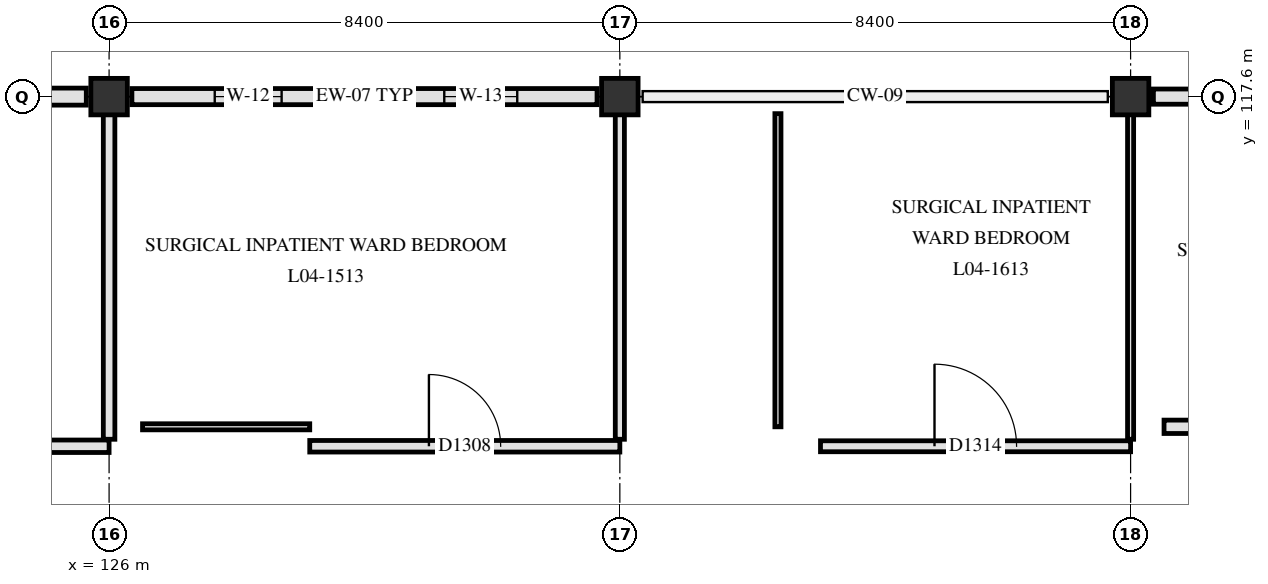
"""IFC4 building model, lengths in metres.
Left out: names, types, materials, properties, quantities, classifications, styles, units other than length and angle.
Written with IfcOpenShell. Run it as: python <this file> out.ifc"""

import sys

from ifc_helpers import new_model, si_unit, direction, frame, frame_2d, origin, origin_2d, place, context, subcontext, project, spatial, rectangle, extrude, element, fill, save


model = new_model("IFC4")
c1 = context("Model", 3, precision=1e-05, world=origin(), true_north=direction((0.0, 1.0)))
c2 = subcontext(c1, "Body", "Model", "MODEL_VIEW")
j1 = project(units=[si_unit("LENGTHUNIT", "METRE"), si_unit("PLANEANGLEUNIT", "RADIAN")], contexts=[c1])
p1 = place(None, origin())
s1 = spatial("IfcSite", under=j1, at=p1, CompositionType="ELEMENT")
p2 = place(p1, origin())
s2 = spatial("IfcBuilding", under=s1, at=p2, CompositionType="ELEMENT")
p3 = place(p2, frame((0.0, 0.0, 18.6)))
s3 = spatial("IfcBuildingStorey", under=s2, at=p3, CompositionType="ELEMENT", Elevation=18.6)
for number, where, z_axis, x_axis in (
    (1, (126.0, 117.6, 0.0), (0.0, 0.0, 1.0), (1.0, 0.0, 0.0)),
    (2, (134.4, 117.6, 0.0), (0.0, 0.0, 1.0), (1.0, 0.0, 0.0)),
    (3, (142.8, 117.6, 0.0), (0.0, 0.0, 1.0), (1.0, 0.0, 0.0)),
):
    element("IfcColumn", number, at=place(p3, frame(where, z_axis=z_axis, x_axis=x_axis)), inside=s3, PredefinedType="COLUMN", context=c2, shape_type="SweptSolid", body=[
        extrude(rectangle(XDim=0.6, YDim=0.6, at=origin_2d()), origin(), (0.0, 0.0, 1.0), 3.9),
    ])
p4 = place(p3, frame((117.975, 117.6, 0.0), z_axis=(0.0, 0.0, 1.0), x_axis=(1.0, 0.0, 0.0)))
e4 = element("IfcWall", 4, at=p4, inside=s3, PredefinedType="SOLIDWALL", context=c2, shape_type="SweptSolid", body=[
    extrude(rectangle(XDim=7.65, YDim=0.28, at=frame_2d((3.825, 0.0))), origin(), (0.0, 0.0, 1.0), 3.31),
])
p5 = place(p4, frame((0.988, 0.0, 0.85)))
e5 = element("IfcOpeningElement", 5, at=p5, cuts=e4, PredefinedType="OPENING", context=c2, shape_type="SweptSolid", body=[
    extrude(rectangle(XDim=1.85, YDim=1.3, at=frame_2d((0.925, 0.65))), frame((0.0, 0.15, 0.0), z_axis=(0.0, -1.0, 0.0), x_axis=(1.0, 0.0, 0.0)), (0.0, 0.0, 1.0), 0.3),
])
p6 = place(p4, frame((5.238, 0.0, 0.85)))
e6 = element("IfcOpeningElement", 6, at=p6, cuts=e4, PredefinedType="OPENING", context=c2, shape_type="SweptSolid", body=[
    extrude(rectangle(XDim=1.0, YDim=1.42, at=frame_2d((0.5, 0.71))), frame((0.0, 0.15, 0.0), z_axis=(0.0, -1.0, 0.0), x_axis=(1.0, 0.0, 0.0)), (0.0, 0.0, 1.0), 0.3),
])
p7 = place(p3, frame((126.375, 117.6, 0.0), z_axis=(0.0, 0.0, 1.0), x_axis=(1.0, 0.0, 0.0)))
e7 = element("IfcWall", 7, at=p7, inside=s3, PredefinedType="SOLIDWALL", context=c2, shape_type="SweptSolid", body=[
    extrude(rectangle(XDim=7.65, YDim=0.265, at=frame_2d((3.825, 0.0))), origin(), (0.0, 0.0, 1.0), 3.31),
])
p8 = place(p7, frame((1.363, 0.0, 0.85)))
e8 = element("IfcOpeningElement", 8, at=p8, cuts=e7, PredefinedType="OPENING", context=c2, shape_type="SweptSolid", body=[
    extrude(rectangle(XDim=1.1, YDim=1.42, at=frame_2d((0.55, 0.71))), frame((0.0, 0.142, 0.0), z_axis=(0.0, -1.0, 0.0), x_axis=(1.0, 0.0, 0.0)), (0.0, 0.0, 1.0), 0.285),
])
p9 = place(p7, frame((5.137, 0.0, 0.85)))
e9 = element("IfcOpeningElement", 9, at=p9, cuts=e7, PredefinedType="OPENING", context=c2, shape_type="SweptSolid", body=[
    extrude(rectangle(XDim=1.2, YDim=1.42, at=frame_2d((0.6, 0.71))), frame((0.0, 0.142, 0.0), z_axis=(0.0, -1.0, 0.0), x_axis=(1.0, 0.0, 0.0)), (0.0, 0.0, 1.0), 0.285),
])
p10 = place(p3, frame((143.175, 117.6, 0.0), z_axis=(0.0, 0.0, 1.0), x_axis=(1.0, 0.0, 0.0)))
e10 = element("IfcWall", 10, at=p10, inside=s3, PredefinedType="SOLIDWALL", context=c2, shape_type="SweptSolid", body=[
    extrude(rectangle(XDim=7.65, YDim=0.25, at=frame_2d((3.825, 0.0))), origin(), (0.0, 0.0, 1.0), 3.31),
])
p11 = place(p10, frame((1.262, 0.0, 0.85)))
e11 = element("IfcOpeningElement", 11, at=p11, cuts=e10, PredefinedType="OPENING", context=c2, shape_type="SweptSolid", body=[
    extrude(rectangle(XDim=1.3, YDim=1.42, at=frame_2d((0.65, 0.71))), frame((0.0, 0.135, 0.0), z_axis=(0.0, -1.0, 0.0), x_axis=(1.0, 0.0, 0.0)), (0.0, 0.0, 1.0), 0.27),
])
p12 = place(p10, frame((5.038, 0.0, 0.85)))
e12 = element("IfcOpeningElement", 12, at=p12, cuts=e10, PredefinedType="OPENING", context=c2, shape_type="SweptSolid", body=[
    extrude(rectangle(XDim=1.4, YDim=1.42, at=frame_2d((0.7, 0.71))), frame((0.0, 0.135, 0.0), z_axis=(0.0, -1.0, 0.0), x_axis=(1.0, 0.0, 0.0)), (0.0, 0.0, 1.0), 0.27),
])
p13 = place(p3, frame((120.9, 111.85, 0.0), z_axis=(0.0, 0.0, 1.0), x_axis=(1.0, 0.0, 0.0)))
e13 = element("IfcWall", 13, at=p13, inside=s3, PredefinedType="PARTITIONING", context=c2, shape_type="SweptSolid", body=[
    extrude(rectangle(XDim=5.1, YDim=0.205, at=frame_2d((2.55, 0.0))), origin(), (0.0, 0.0, 1.0), 3.26),
])
p14 = place(p13, frame((1.63, 0.0, 0.0)))
e14 = element("IfcOpeningElement", 14, at=p14, cuts=e13, PredefinedType="OPENING", context=c2, shape_type="SweptSolid", body=[
    extrude(rectangle(XDim=1.84, YDim=2.28, at=frame_2d((0.92, 1.14))), frame((0.0, 0.113, 0.0), z_axis=(0.0, -1.0, 0.0), x_axis=(1.0, 0.0, 0.0)), (0.0, 0.0, 1.0), 0.225),
])
p15 = place(p3, frame((129.3, 111.85, 0.0), z_axis=(0.0, 0.0, 1.0), x_axis=(1.0, 0.0, 0.0)))
e15 = element("IfcWall", 15, at=p15, inside=s3, PredefinedType="PARTITIONING", context=c2, shape_type="SweptSolid", body=[
    extrude(rectangle(XDim=5.1, YDim=0.19, at=frame_2d((2.55, 0.0))), origin(), (0.0, 0.0, 1.0), 3.26),
])
p16 = place(p15, frame((1.96, 0.0, 0.0)))
e16 = element("IfcOpeningElement", 16, at=p16, cuts=e15, PredefinedType="OPENING", context=c2, shape_type="SweptSolid", body=[
    extrude(rectangle(XDim=1.18, YDim=2.18, at=frame_2d((0.59, 1.09))), frame((0.0, 0.105, 0.0), z_axis=(0.0, -1.0, 0.0), x_axis=(1.0, 0.0, 0.0)), (0.0, 0.0, 1.0), 0.21),
])
p17 = place(p3, frame((137.7, 111.85, 0.0), z_axis=(0.0, 0.0, 1.0), x_axis=(1.0, 0.0, 0.0)))
e17 = element("IfcWall", 17, at=p17, inside=s3, PredefinedType="PARTITIONING", context=c2, shape_type="SweptSolid", body=[
    extrude(rectangle(XDim=5.1, YDim=0.18, at=frame_2d((2.55, 0.0))), origin(), (0.0, 0.0, 1.0), 3.26),
])
p18 = place(p17, frame((1.875, 0.0, 0.0)))
e18 = element("IfcOpeningElement", 18, at=p18, cuts=e17, PredefinedType="OPENING", context=c2, shape_type="SweptSolid", body=[
    extrude(rectangle(XDim=1.35, YDim=2.2, at=frame_2d((0.675, 1.1))), frame((0.0, 0.1, 0.0), z_axis=(0.0, -1.0, 0.0), x_axis=(1.0, 0.0, 0.0)), (0.0, 0.0, 1.0), 0.2),
])
p19 = place(p3, frame((126.55, 112.17, 0.0), z_axis=(0.0, 0.0, 1.0), x_axis=(1.0, 0.0, 0.0)))
e19 = element("IfcWall", 19, at=p19, inside=s3, PredefinedType="PARTITIONING", context=c2, shape_type="SweptSolid", body=[
    extrude(rectangle(XDim=2.75, YDim=0.1, at=frame_2d((1.375, 0.0))), origin(), (0.0, 0.0, 1.0), 3.61),
])
p20 = place(p3, frame((143.35, 112.17, 0.0), z_axis=(0.0, 0.0, 1.0), x_axis=(1.0, 0.0, 0.0)))
e20 = element("IfcWall", 20, at=p20, inside=s3, PredefinedType="PARTITIONING", context=c2, shape_type="SweptSolid", body=[
    extrude(rectangle(XDim=2.75, YDim=0.22, at=frame_2d((1.375, 0.0))), origin(), (0.0, 0.0, 1.0), 3.31),
])
p21 = place(p3, frame((126.0, 111.965, 0.0), z_axis=(0.0, 0.0, 1.0), x_axis=(0.0, 1.0, 0.0)))
e21 = element("IfcWall", 21, at=p21, inside=s3, PredefinedType="PARTITIONING", context=c2, shape_type="SweptSolid", body=[
    extrude(rectangle(XDim=5.34, YDim=0.19, at=frame_2d((2.67, 0.0))), origin(), (0.0, 0.0, 1.0), 3.26),
])
p22 = place(p3, frame((134.4, 111.965, 0.0), z_axis=(0.0, 0.0, 1.0), x_axis=(0.0, 1.0, 0.0)))
e22 = element("IfcWall", 22, at=p22, inside=s3, PredefinedType="PARTITIONING", context=c2, shape_type="SweptSolid", body=[
    extrude(rectangle(XDim=5.34, YDim=0.15, at=frame_2d((2.67, 0.0))), origin(), (0.0, 0.0, 1.0), 3.26),
])
p23 = place(p3, frame((137.0, 112.17, 0.0), z_axis=(0.0, 0.0, 1.0), x_axis=(0.0, 1.0, 0.0)))
e23 = element("IfcWall", 23, at=p23, inside=s3, PredefinedType="PARTITIONING", context=c2, shape_type="SweptSolid", body=[
    extrude(rectangle(XDim=5.15, YDim=0.1, at=frame_2d((2.575, 0.0))), origin(), (0.0, 0.0, 1.0), 3.31),
])
p24 = place(p3, frame((142.8, 111.965, 0.0), z_axis=(0.0, 0.0, 1.0), x_axis=(0.0, 1.0, 0.0)))
e24 = element("IfcWall", 24, at=p24, inside=s3, PredefinedType="PARTITIONING", context=c2, shape_type="SweptSolid", body=[
    extrude(rectangle(XDim=5.34, YDim=0.1, at=frame_2d((2.67, 0.0))), origin(), (0.0, 0.0, 1.0), 3.26),
])
p25 = place(p8, origin())
e25 = element("IfcWindow", 25, at=p25, inside=s3, PartitioningType="SINGLE_PANEL", PredefinedType="WINDOW", context=c2, shape_type="SweptSolid", body=[
    extrude(rectangle(XDim=1.1, YDim=1.42, at=frame_2d((0.55, 0.71))), frame((0.0, 0.03, 0.0), z_axis=(0.0, -1.0, 0.0), x_axis=(1.0, 0.0, 0.0)), (0.0, 0.0, 1.0), 0.06),
])
fill(e8, e25)
p26 = place(p9, origin())
e26 = element("IfcWindow", 26, at=p26, inside=s3, PartitioningType="SINGLE_PANEL", PredefinedType="WINDOW", context=c2, shape_type="SweptSolid", body=[
    extrude(rectangle(XDim=1.2, YDim=1.42, at=frame_2d((0.6, 0.71))), frame((0.0, 0.03, 0.0), z_axis=(0.0, -1.0, 0.0), x_axis=(1.0, 0.0, 0.0)), (0.0, 0.0, 1.0), 0.06),
])
fill(e9, e26)
p27 = place(p16, origin())
e27 = element("IfcDoor", 27, at=p27, inside=s3, OperationType="SINGLE_SWING_LEFT", PredefinedType="DOOR", context=c2, shape_type="SweptSolid", body=[
    extrude(rectangle(XDim=1.18, YDim=2.18, at=frame_2d((0.59, 1.09))), frame((0.0, 0.025, 0.0), z_axis=(0.0, -1.0, 0.0), x_axis=(1.0, 0.0, 0.0)), (0.0, 0.0, 1.0), 0.05),
])
fill(e16, e27)
p28 = place(p18, origin())
e28 = element("IfcDoor", 28, at=p28, inside=s3, OperationType="SINGLE_SWING_LEFT", PredefinedType="DOOR", context=c2, shape_type="SweptSolid", body=[
    extrude(rectangle(XDim=1.35, YDim=2.2, at=frame_2d((0.675, 1.1))), frame((0.0, 0.025, 0.0), z_axis=(0.0, -1.0, 0.0), x_axis=(1.0, 0.0, 0.0)), (0.0, 0.0, 1.0), 0.05),
])
fill(e18, e28)
save(model, sys.argv[1])
